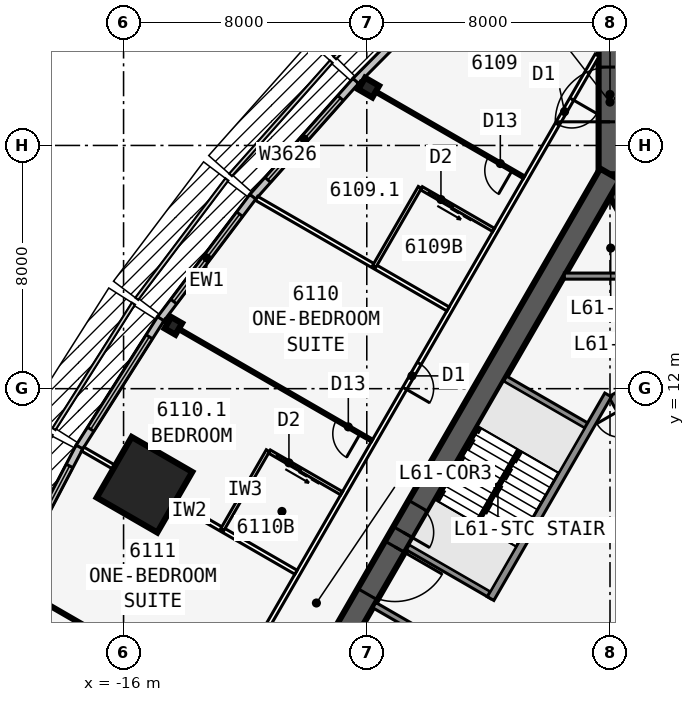
"""IFC4 building model, lengths in metres.
Left out: names, types, materials, properties, quantities, classifications, styles, units other than length and angle.
Written with IfcOpenShell. Run it as: python <this file> out.ifc"""

import sys

from ifc_helpers import new_model, si_unit, direction, frame, frame_2d, origin, origin_2d, place, context, subcontext, project, spatial, rectangle, i_section, extrude, element, fill, save


model = new_model("IFC4")
c1 = context("Model", 3, precision=1e-05, world=origin(), true_north=direction((0.0, 1.0)))
c2 = subcontext(c1, "Body", "Model", "MODEL_VIEW")
j1 = project(units=[si_unit("LENGTHUNIT", "METRE"), si_unit("PLANEANGLEUNIT", "RADIAN")], contexts=[c1])
p1 = place(None, origin())
s1 = spatial("IfcSite", under=j1, at=p1, CompositionType="ELEMENT")
p2 = place(p1, origin())
s2 = spatial("IfcBuilding", under=s1, at=p2, CompositionType="ELEMENT")
p3 = place(p2, frame((0.0, 0.0, 229.7)))
s3 = spatial("IfcBuildingStorey", under=s2, at=p3, CompositionType="ELEMENT", Elevation=229.7)
p4 = place(p3, frame((16.5, -9.526, 0.0), z_axis=(0.0, 0.0, 1.0), x_axis=(-0.499999749417, 0.866025548458, 0.0)))
e1 = element("IfcWall", 1, at=p4, inside=s3, PredefinedType="SHEAR", context=c2, shape_type="SweptSolid", body=[
    extrude(rectangle(XDim=33.0, YDim=0.75, at=frame_2d((16.5, 0.0))), origin(), (0.0, 0.0, 1.0), 3.6),
])
p5 = place(p4, frame((14.15, 0.0, 0.0)))
e2 = element("IfcOpeningElement", 2, at=p5, cuts=e1, PredefinedType="OPENING", context=c2, shape_type="SweptSolid", body=[
    extrude(rectangle(XDim=1.8, YDim=2.13, at=frame_2d((0.9, 1.065))), frame((0.0, 0.385, 0.0), z_axis=(0.0, -1.0, 0.0), x_axis=(1.0, 0.0, 0.0)), (0.0, 0.0, 1.0), 0.77),
])
p6 = place(p4, frame((12.6, 0.0, 0.0)))
e3 = element("IfcOpeningElement", 3, at=p6, cuts=e1, PredefinedType="OPENING", context=c2, shape_type="SweptSolid", body=[
    extrude(rectangle(XDim=1.0, YDim=2.13, at=frame_2d((0.5, 1.065))), frame((0.0, 0.385, 0.0), z_axis=(0.0, -1.0, 0.0), x_axis=(1.0, 0.0, 0.0)), (0.0, 0.0, 1.0), 0.77),
])
p7 = place(p3, frame((5.379, 2.586, 0.0), z_axis=(0.0, 0.0, 1.0), x_axis=(-0.500001375892, 0.866024609411, 0.0)))
e4 = element("IfcWall", 4, at=p7, inside=s3, PredefinedType="SOLIDWALL", context=c2, shape_type="SweptSolid", body=[
    extrude(rectangle(XDim=10.633, YDim=0.25, at=frame_2d((5.316, 0.0))), origin(), (0.0, 0.0, 1.0), 3.35),
])
p8 = place(p7, frame((9.164, 0.0, 0.0)))
e5 = element("IfcOpeningElement", 5, at=p8, cuts=e4, PredefinedType="OPENING", context=c2, shape_type="SweptSolid", body=[
    extrude(rectangle(XDim=0.9, YDim=2.13, at=frame_2d((0.45, 1.065))), frame((0.0, 0.135, 0.0), z_axis=(0.0, -1.0, 0.0), x_axis=(1.0, 0.0, 0.0)), (0.0, 0.0, 1.0), 0.27),
])
p9 = place(p7, frame((1.0, 0.0, 0.0)))
e6 = element("IfcOpeningElement", 6, at=p9, cuts=e4, PredefinedType="OPENING", context=c2, shape_type="SweptSolid", body=[
    extrude(rectangle(XDim=1.1, YDim=2.13, at=frame_2d((0.55, 1.065))), frame((0.0, 0.135, 0.0), z_axis=(0.0, -1.0, 0.0), x_axis=(1.0, 0.0, 0.0)), (0.0, 0.0, 1.0), 0.27),
])
p10 = place(p7, frame((3.9, 0.0, 0.0)))
e7 = element("IfcOpeningElement", 7, at=p10, cuts=e4, PredefinedType="OPENING", context=c2, shape_type="SweptSolid", body=[
    extrude(rectangle(XDim=1.1, YDim=2.13, at=frame_2d((0.55, 1.065))), frame((0.0, 0.135, 0.0), z_axis=(0.0, -1.0, 0.0), x_axis=(1.0, 0.0, 0.0)), (0.0, 0.0, 1.0), 0.27),
])
p11 = place(p7, frame((6.8, 0.0, 0.0)))
e8 = element("IfcOpeningElement", 8, at=p11, cuts=e4, PredefinedType="OPENING", context=c2, shape_type="SweptSolid", body=[
    extrude(rectangle(XDim=1.1, YDim=2.13, at=frame_2d((0.55, 1.065))), frame((0.0, 0.135, 0.0), z_axis=(0.0, -1.0, 0.0), x_axis=(1.0, 0.0, 0.0)), (0.0, 0.0, 1.0), 0.27),
])
p12 = place(p3, frame((0.0, 19.052, 0.0), z_axis=(0.0, 0.0, 1.0), x_axis=(-0.499999749417, -0.866025548458, 0.0)))
e9 = element("IfcWall", 9, at=p12, inside=s3, PredefinedType="SHEAR", context=c2, shape_type="SweptSolid", body=[
    extrude(rectangle(XDim=33.0, YDim=0.75, at=frame_2d((16.5, 0.0))), origin(), (0.0, 0.0, 1.0), 3.6),
])
p13 = place(p12, frame((14.15, 0.0, 0.0)))
e10 = element("IfcOpeningElement", 10, at=p13, cuts=e9, PredefinedType="OPENING", context=c2, shape_type="SweptSolid", body=[
    extrude(rectangle(XDim=1.8, YDim=2.13, at=frame_2d((0.9, 1.065))), frame((0.0, 0.385, 0.0), z_axis=(0.0, -1.0, 0.0), x_axis=(1.0, 0.0, 0.0)), (0.0, 0.0, 1.0), 0.77),
])
p14 = place(p12, frame((12.6, 0.0, 0.0)))
e11 = element("IfcOpeningElement", 11, at=p14, cuts=e9, PredefinedType="OPENING", context=c2, shape_type="SweptSolid", body=[
    extrude(rectangle(XDim=1.0, YDim=2.13, at=frame_2d((0.5, 1.065))), frame((0.0, 0.385, 0.0), z_axis=(0.0, -1.0, 0.0), x_axis=(1.0, 0.0, 0.0)), (0.0, 0.0, 1.0), 0.77),
])
p15 = place(p3, frame((-0.062, 11.794, 0.0), z_axis=(0.0, 0.0, 1.0), x_axis=(-0.500006680225, -0.86602154692, 0.0)))
e12 = element("IfcWall", 12, at=p15, inside=s3, PredefinedType="SOLIDWALL", context=c2, shape_type="SweptSolid", body=[
    extrude(rectangle(XDim=7.733, YDim=0.25, at=frame_2d((3.866, 0.0))), origin(), (0.0, 0.0, 1.0), 3.35),
])
for number, where, z_axis, x_axis in (
    (13, (-0.679, 10.727, 0.0), (0.0, 0.0, 1.0), (-0.866, 0.5, 0.0)),
    (14, (-3.879, 5.184, 0.0), (0.0, 0.0, 1.0), (-0.866, 0.5, 0.0)),
    (15, (-4.979, 3.279, 0.0), (0.0, 0.0, 1.0), (-0.866, 0.5, 0.0)),
):
    element("IfcWall", number, at=place(p3, frame(where, z_axis=z_axis, x_axis=x_axis)), inside=s3, PredefinedType="SOLIDWALL", context=c2, shape_type="SweptSolid", body=[
        extrude(rectangle(XDim=3.2, YDim=0.2, at=frame_2d((1.6, 0.0))), origin(), (0.0, 0.0, 1.0), 3.35),
    ])
p16 = place(p3, frame((0.0, 19.052, 0.0), z_axis=(0.0, 0.0, 1.0), x_axis=(0.0, 1.0, 0.0)))
e16 = element("IfcWall", 16, at=p16, inside=s3, PredefinedType="SHEAR", context=c2, shape_type="SweptSolid", body=[
    extrude(rectangle(XDim=4.746, YDim=0.75, at=frame_2d((2.373, 0.0))), origin(), (0.0, 0.0, 1.0), 3.6),
])
p17 = place(p16, frame((1.725, 0.0, 0.0)))
e17 = element("IfcOpeningElement", 17, at=p17, cuts=e16, PredefinedType="OPENING", context=c2, shape_type="SweptSolid", body=[
    extrude(rectangle(XDim=1.8, YDim=2.13, at=frame_2d((0.9, 1.065))), frame((0.0, 0.385, 0.0), z_axis=(0.0, -1.0, 0.0), x_axis=(1.0, 0.0, 0.0)), (0.0, 0.0, 1.0), 0.77),
])
p18 = place(p3, frame((-7.937, 21.903, 0.0), z_axis=(0.0, 0.0, 1.0), x_axis=(-0.5, -0.866025403784, 0.0)))
e18 = element("IfcColumn", 18, at=p18, inside=s3, PredefinedType="COLUMN", context=c2, shape_type="SweptSolid", body=[
    extrude(i_section(OverallWidth=0.442, OverallDepth=0.531, WebThickness=0.066, FlangeThickness=0.106, at=origin_2d()), origin(), (0.0, 0.0, 1.0), 3.6),
])
p19 = place(p3, frame((-14.363, 14.066, 0.0), z_axis=(0.0, 0.0, 1.0), x_axis=(-0.866025403784, 0.5, 0.0)))
e19 = element("IfcColumn", 19, at=p19, inside=s3, PredefinedType="COLUMN", context=c2, shape_type="SweptSolid", body=[
    extrude(i_section(OverallWidth=0.411, OverallDepth=0.434, WebThickness=0.036, FlangeThickness=0.057, at=origin_2d()), origin(), (0.0, 0.0, 1.0), 3.6),
])
p20 = place(p3, frame((-15.312, 8.84, 0.0), z_axis=(0.0, 0.0, 1.0), x_axis=(-0.866025403784, 0.5, 0.0)))
e20 = element("IfcColumn", 20, at=p20, inside=s3, PredefinedType="COLUMN", context=c2, shape_type="SweptSolid", body=[
    extrude(rectangle(XDim=2.3, YDim=2.3, at=origin_2d()), origin(), (0.0, 0.0, 1.0), 3.6),
])
p21 = place(p3, frame((-6.911, 23.583, 0.0), z_axis=(0.0, 0.0, 1.0), x_axis=(-0.704149946111, -0.710051303352, 0.0)))
e21 = element("IfcWall", 21, at=p21, inside=s3, PredefinedType="STANDARD", context=c2, shape_type="SweptSolid", body=[
    extrude(rectangle(XDim=2.069, YDim=0.25, at=frame_2d((1.034, 0.0))), origin(), (0.0, 0.0, 1.0), 3.35),
])
p22 = place(p3, frame((-8.363, 22.12, 0.0), z_axis=(0.0, 0.0, 1.0), x_axis=(-0.664348996191, -0.747422511876, 0.0)))
e22 = element("IfcWall", 22, at=p22, inside=s3, PredefinedType="STANDARD", context=c2, shape_type="SweptSolid", body=[
    extrude(rectangle(XDim=5.105, YDim=0.25, at=frame_2d((2.552, 0.0))), origin(), (0.0, 0.0, 1.0), 3.35),
])
p23 = place(p22, frame((0.752, 0.0, 0.45)))
e23 = element("IfcOpeningElement", 23, at=p23, cuts=e22, PredefinedType="OPENING", context=c2, shape_type="SweptSolid", body=[
    extrude(rectangle(XDim=3.6, YDim=2.6, at=frame_2d((1.8, 1.3))), frame((0.0, 0.135, 0.0), z_axis=(0.0, -1.0, 0.0), x_axis=(1.0, 0.0, 0.0)), (0.0, 0.0, 1.0), 0.27),
])
p24 = place(p3, frame((-11.748, 18.312, 0.0), z_axis=(0.0, 0.0, 1.0), x_axis=(-0.602408653511, -0.798187831388, 0.0)))
e24 = element("IfcWall", 24, at=p24, inside=s3, PredefinedType="STANDARD", context=c2, shape_type="SweptSolid", body=[
    extrude(rectangle(XDim=5.038, YDim=0.25, at=frame_2d((2.519, 0.0))), origin(), (0.0, 0.0, 1.0), 3.35),
])
p25 = place(p24, frame((0.719, 0.0, 0.45)))
e25 = element("IfcOpeningElement", 25, at=p25, cuts=e24, PredefinedType="OPENING", context=c2, shape_type="SweptSolid", body=[
    extrude(rectangle(XDim=3.6, YDim=2.6, at=frame_2d((1.8, 1.3))), frame((0.0, 0.135, 0.0), z_axis=(0.0, -1.0, 0.0), x_axis=(1.0, 0.0, 0.0)), (0.0, 0.0, 1.0), 0.27),
])
p26 = place(p3, frame((-14.777, 14.299, 0.0), z_axis=(0.0, 0.0, 1.0), x_axis=(-0.535220361449, -0.844712474568, 0.0)))
e26 = element("IfcWall", 26, at=p26, inside=s3, PredefinedType="STANDARD", context=c2, shape_type="SweptSolid", body=[
    extrude(rectangle(XDim=5.004, YDim=0.25, at=frame_2d((2.502, 0.0))), origin(), (0.0, 0.0, 1.0), 3.35),
])
p27 = place(p26, frame((0.702, 0.0, 0.45)))
e27 = element("IfcOpeningElement", 27, at=p27, cuts=e26, PredefinedType="OPENING", context=c2, shape_type="SweptSolid", body=[
    extrude(rectangle(XDim=3.6, YDim=2.6, at=frame_2d((1.8, 1.3))), frame((0.0, 0.135, 0.0), z_axis=(0.0, -1.0, 0.0), x_axis=(1.0, 0.0, 0.0)), (0.0, 0.0, 1.0), 0.27),
])
p28 = place(p3, frame((-17.45, 10.081, 0.0), z_axis=(0.0, 0.0, 1.0), x_axis=(-0.463976002579, -0.885847768542, 0.0)))
e28 = element("IfcWall", 28, at=p28, inside=s3, PredefinedType="STANDARD", context=c2, shape_type="SweptSolid", body=[
    extrude(rectangle(XDim=5.004, YDim=0.25, at=frame_2d((2.502, 0.0))), origin(), (0.0, 0.0, 1.0), 3.35),
])
p29 = place(p28, frame((0.702, 0.0, 0.45)))
e29 = element("IfcOpeningElement", 29, at=p29, cuts=e28, PredefinedType="OPENING", context=c2, shape_type="SweptSolid", body=[
    extrude(rectangle(XDim=3.6, YDim=2.6, at=frame_2d((1.8, 1.3))), frame((0.0, 0.135, 0.0), z_axis=(0.0, -1.0, 0.0), x_axis=(1.0, 0.0, 0.0)), (0.0, 0.0, 1.0), 0.27),
])
p30 = place(p3, frame((-0.425, 22.966, 0.0), z_axis=(0.0, 0.0, 1.0), x_axis=(-0.500000265775, -0.866025250339, 0.0)))
e30 = element("IfcWall", 30, at=p30, inside=s3, PredefinedType="PARTITIONING", context=c2, shape_type="SweptSolid", body=[
    extrude(rectangle(XDim=39.354, YDim=0.15, at=frame_2d((19.677, 0.0))), origin(), (0.0, 0.0, 1.0), 3.35),
])
p31 = place(p30, frame((1.665, 0.0, 0.0)))
e31 = element("IfcOpeningElement", 31, at=p31, cuts=e30, PredefinedType="OPENING", context=c2, shape_type="SweptSolid", body=[
    extrude(rectangle(XDim=0.95, YDim=2.13, at=frame_2d((0.475, 1.065))), frame((0.0, 0.085, 0.0), z_axis=(0.0, -1.0, 0.0), x_axis=(1.0, 0.0, 0.0)), (0.0, 0.0, 1.0), 0.17),
])
p32 = place(p30, frame((11.702, 0.0, 0.0)))
e32 = element("IfcOpeningElement", 32, at=p32, cuts=e30, PredefinedType="OPENING", context=c2, shape_type="SweptSolid", body=[
    extrude(rectangle(XDim=0.95, YDim=2.13, at=frame_2d((0.475, 1.065))), frame((0.0, 0.085, 0.0), z_axis=(0.0, -1.0, 0.0), x_axis=(1.0, 0.0, 0.0)), (0.0, 0.0, 1.0), 0.17),
])
p33 = place(p30, frame((21.702, 0.0, 0.0)))
e33 = element("IfcOpeningElement", 33, at=p33, cuts=e30, PredefinedType="OPENING", context=c2, shape_type="SweptSolid", body=[
    extrude(rectangle(XDim=0.95, YDim=2.13, at=frame_2d((0.475, 1.065))), frame((0.0, 0.085, 0.0), z_axis=(0.0, -1.0, 0.0), x_axis=(1.0, 0.0, 0.0)), (0.0, 0.0, 1.0), 0.17),
])
p34 = place(p30, frame((36.739, 0.0, 0.0)))
e34 = element("IfcOpeningElement", 34, at=p34, cuts=e30, PredefinedType="OPENING", context=c2, shape_type="SweptSolid", body=[
    extrude(rectangle(XDim=0.95, YDim=2.13, at=frame_2d((0.475, 1.065))), frame((0.0, 0.085, 0.0), z_axis=(0.0, -1.0, 0.0), x_axis=(1.0, 0.0, 0.0)), (0.0, 0.0, 1.0), 0.17),
])
p35 = place(p3, frame((-2.829, 18.954, 0.0), z_axis=(0.0, 0.0, 1.0), x_axis=(-0.866026604282, 0.499997920671, 0.0)))
e35 = element("IfcWall", 35, at=p35, inside=s3, PredefinedType="PARTITIONING", context=c2, shape_type="SweptSolid", body=[
    extrude(rectangle(XDim=6.24, YDim=0.1, at=frame_2d((3.12, 0.0))), origin(), (0.0, 0.0, 1.0), 2.25),
])
p36 = place(p35, frame((0.45, 0.0, 0.0)))
e36 = element("IfcOpeningElement", 36, at=p36, cuts=e35, PredefinedType="OPENING", context=c2, shape_type="SweptSolid", body=[
    extrude(rectangle(XDim=0.9, YDim=2.13, at=frame_2d((0.45, 1.065))), frame((0.0, 0.06, 0.0), z_axis=(0.0, -1.0, 0.0), x_axis=(1.0, 0.0, 0.0)), (0.0, 0.0, 1.0), 0.12),
])
p37 = place(p3, frame((-5.329, 14.623, 0.0), z_axis=(0.0, 0.0, 1.0), x_axis=(-0.866017877653, 0.500013035415, 0.0)))
e37 = element("IfcWall", 37, at=p37, inside=s3, PredefinedType="PARTITIONING", context=c2, shape_type="SweptSolid", body=[
    extrude(rectangle(XDim=7.273, YDim=0.15, at=frame_2d((3.636, 0.0))), origin(), (0.0, 0.0, 1.0), 2.309),
])
p38 = place(p3, frame((-7.829, 10.293, 0.0), z_axis=(0.0, 0.0, 1.0), x_axis=(-0.866030558329, 0.49999107196, 0.0)))
e38 = element("IfcWall", 38, at=p38, inside=s3, PredefinedType="PARTITIONING", context=c2, shape_type="SweptSolid", body=[
    extrude(rectangle(XDim=7.894, YDim=0.1, at=frame_2d((3.947, 0.0))), origin(), (0.0, 0.0, 1.0), 2.25),
])
p39 = place(p38, frame((0.45, 0.0, 0.0)))
e39 = element("IfcOpeningElement", 39, at=p39, cuts=e38, PredefinedType="OPENING", context=c2, shape_type="SweptSolid", body=[
    extrude(rectangle(XDim=0.9, YDim=2.13, at=frame_2d((0.45, 1.065))), frame((0.0, 0.06, 0.0), z_axis=(0.0, -1.0, 0.0), x_axis=(1.0, 0.0, 0.0)), (0.0, 0.0, 1.0), 0.12),
])
p40 = place(p3, frame((-10.329, 5.963, 0.0), z_axis=(0.0, 0.0, 1.0), x_axis=(-0.866016460812, 0.500015489362, 0.0)))
e40 = element("IfcWall", 40, at=p40, inside=s3, PredefinedType="PARTITIONING", context=c2, shape_type="SweptSolid", body=[
    extrude(rectangle(XDim=8.101, YDim=0.15, at=frame_2d((4.051, 0.0))), origin(), (0.0, 0.0, 1.0), 2.309),
])
p41 = place(p3, frame((-12.829, 1.633, 0.0), z_axis=(0.0, 0.0, 1.0), x_axis=(-0.866030558329, 0.49999107196, 0.0)))
e41 = element("IfcWall", 41, at=p41, inside=s3, PredefinedType="PARTITIONING", context=c2, shape_type="SweptSolid", body=[
    extrude(rectangle(XDim=7.894, YDim=0.1, at=frame_2d((3.947, 0.0))), origin(), (0.0, 0.0, 1.0), 2.25),
])
p42 = place(p41, frame((0.45, 0.0, 0.0)))
e42 = element("IfcOpeningElement", 42, at=p42, cuts=e41, PredefinedType="OPENING", context=c2, shape_type="SweptSolid", body=[
    extrude(rectangle(XDim=0.9, YDim=2.13, at=frame_2d((0.45, 1.065))), frame((0.0, 0.06, 0.0), z_axis=(0.0, -1.0, 0.0), x_axis=(1.0, 0.0, 0.0)), (0.0, 0.0, 1.0), 0.12),
])
p43 = place(p3, frame((-6.253, 18.622, 0.0), z_axis=(0.0, 0.0, 1.0), x_axis=(-0.499990139034, -0.866031096941, 0.0)))
e43 = element("IfcWall", 43, at=p43, inside=s3, PredefinedType="PLUMBINGWALL", context=c2, shape_type="SweptSolid", body=[
    extrude(rectangle(XDim=3.0, YDim=0.12, at=frame_2d((1.5, 0.0))), origin(), (0.0, 0.0, 1.0), 3.35),
])
p44 = place(p3, frame((-3.829, 17.221, 0.0), z_axis=(0.0, 0.0, 1.0), x_axis=(-0.865997131366, 0.500048966069, 0.0)))
e44 = element("IfcWall", 44, at=p44, inside=s3, PredefinedType="PLUMBINGWALL", context=c2, shape_type="SweptSolid", body=[
    extrude(rectangle(XDim=2.74, YDim=0.12, at=frame_2d((1.37, 0.0))), origin(), (0.0, 0.0, 1.0), 3.35),
])
p45 = place(p44, frame((1.55, 0.0, 0.0)))
e45 = element("IfcOpeningElement", 45, at=p45, cuts=e44, PredefinedType="OPENING", context=c2, shape_type="SweptSolid", body=[
    extrude(rectangle(XDim=0.9, YDim=2.13, at=frame_2d((0.45, 1.065))), frame((0.0, 0.07, 0.0), z_axis=(0.0, -1.0, 0.0), x_axis=(1.0, 0.0, 0.0)), (0.0, 0.0, 1.0), 0.14),
])
p46 = place(p3, frame((-11.253, 9.961, 0.0), z_axis=(0.0, 0.0, 1.0), x_axis=(-0.499990139034, -0.866031096941, 0.0)))
e46 = element("IfcWall", 46, at=p46, inside=s3, PredefinedType="PLUMBINGWALL", context=c2, shape_type="SweptSolid", body=[
    extrude(rectangle(XDim=3.0, YDim=0.12, at=frame_2d((1.5, 0.0))), origin(), (0.0, 0.0, 1.0), 3.35),
])
p47 = place(p3, frame((-8.829, 8.561, 0.0), z_axis=(0.0, 0.0, 1.0), x_axis=(-0.866035715982, 0.499982138324, 0.0)))
e47 = element("IfcWall", 47, at=p47, inside=s3, PredefinedType="PLUMBINGWALL", context=c2, shape_type="SweptSolid", body=[
    extrude(rectangle(XDim=2.74, YDim=0.12, at=frame_2d((1.37, 0.0))), origin(), (0.0, 0.0, 1.0), 3.35),
])
p48 = place(p47, frame((1.55, 0.0, 0.0)))
e48 = element("IfcOpeningElement", 48, at=p48, cuts=e47, PredefinedType="OPENING", context=c2, shape_type="SweptSolid", body=[
    extrude(rectangle(XDim=0.9, YDim=2.13, at=frame_2d((0.45, 1.065))), frame((0.0, 0.07, 0.0), z_axis=(0.0, -1.0, 0.0), x_axis=(1.0, 0.0, 0.0)), (0.0, 0.0, 1.0), 0.14),
])
p49 = place(p3, frame((-1.501, 15.703, 0.0), z_axis=(0.0, 0.0, 1.0), x_axis=(1.0, 0.0, 0.0)))
e49 = element("IfcWall", 49, at=p49, inside=s3, PredefinedType="SOLIDWALL", context=c2, shape_type="SweptSolid", body=[
    extrude(rectangle(XDim=3.002, YDim=0.2, at=frame_2d((1.501, 0.0))), origin(), (0.0, 0.0, 1.0), 3.35),
])
p50 = place(p3, frame((-2.988, 9.978, 0.0), z_axis=(0.0, 0.0, 1.0), x_axis=(-0.499992232847, -0.866029888106, 0.0)))
e50 = element("IfcWall", 50, at=p50, inside=s3, PredefinedType="SOLIDWALL", context=c2, shape_type="SweptSolid", body=[
    extrude(rectangle(XDim=2.794, YDim=0.1, at=frame_2d((1.397, 0.0))), origin(), (0.0, 0.0, 1.0), 3.6),
])
p51 = place(p23, origin())
e51 = element("IfcWindow", 51, at=p51, inside=s3, PartitioningType="SINGLE_PANEL", PredefinedType="WINDOW", context=c2, shape_type="SweptSolid", body=[
    extrude(rectangle(XDim=3.6, YDim=2.6, at=frame_2d((1.8, 1.3))), frame((0.0, 0.03, 0.0), z_axis=(0.0, -1.0, 0.0), x_axis=(1.0, 0.0, 0.0)), (0.0, 0.0, 1.0), 0.06),
])
fill(e23, e51)
p52 = place(p25, origin())
e52 = element("IfcWindow", 52, at=p52, inside=s3, PartitioningType="SINGLE_PANEL", PredefinedType="WINDOW", context=c2, shape_type="SweptSolid", body=[
    extrude(rectangle(XDim=3.6, YDim=2.6, at=frame_2d((1.8, 1.3))), frame((0.0, 0.03, 0.0), z_axis=(0.0, -1.0, 0.0), x_axis=(1.0, 0.0, 0.0)), (0.0, 0.0, 1.0), 0.06),
])
fill(e25, e52)
p53 = place(p27, origin())
e53 = element("IfcWindow", 53, at=p53, inside=s3, PartitioningType="SINGLE_PANEL", PredefinedType="WINDOW", context=c2, shape_type="SweptSolid", body=[
    extrude(rectangle(XDim=3.6, YDim=2.6, at=frame_2d((1.8, 1.3))), frame((0.0, 0.03, 0.0), z_axis=(0.0, -1.0, 0.0), x_axis=(1.0, 0.0, 0.0)), (0.0, 0.0, 1.0), 0.06),
])
fill(e27, e53)
p54 = place(p29, origin())
e54 = element("IfcWindow", 54, at=p54, inside=s3, PartitioningType="SINGLE_PANEL", PredefinedType="WINDOW", context=c2, shape_type="SweptSolid", body=[
    extrude(rectangle(XDim=3.6, YDim=2.6, at=frame_2d((1.8, 1.3))), frame((0.0, 0.03, 0.0), z_axis=(0.0, -1.0, 0.0), x_axis=(1.0, 0.0, 0.0)), (0.0, 0.0, 1.0), 0.06),
])
fill(e29, e54)
p55 = place(p36, origin())
e55 = element("IfcDoor", 55, at=p55, inside=s3, OperationType="SINGLE_SWING_LEFT", PredefinedType="DOOR", context=c2, shape_type="SweptSolid", body=[
    extrude(rectangle(XDim=0.9, YDim=2.13, at=frame_2d((0.45, 1.065))), frame((0.0, 0.025, 0.0), z_axis=(0.0, -1.0, 0.0), x_axis=(1.0, 0.0, 0.0)), (0.0, 0.0, 1.0), 0.05),
])
fill(e36, e55)
p56 = place(p39, origin())
e56 = element("IfcDoor", 56, at=p56, inside=s3, OperationType="SINGLE_SWING_LEFT", PredefinedType="DOOR", context=c2, shape_type="SweptSolid", body=[
    extrude(rectangle(XDim=0.9, YDim=2.13, at=frame_2d((0.45, 1.065))), frame((0.0, 0.025, 0.0), z_axis=(0.0, -1.0, 0.0), x_axis=(1.0, 0.0, 0.0)), (0.0, 0.0, 1.0), 0.05),
])
fill(e39, e56)
p57 = place(p31, origin())
e57 = element("IfcDoor", 57, at=p57, inside=s3, OperationType="SINGLE_SWING_LEFT", PredefinedType="DOOR", context=c2, shape_type="SweptSolid", body=[
    extrude(rectangle(XDim=0.95, YDim=2.13, at=frame_2d((0.475, 1.065))), frame((0.0, 0.025, 0.0), z_axis=(0.0, -1.0, 0.0), x_axis=(1.0, 0.0, 0.0)), (0.0, 0.0, 1.0), 0.05),
])
fill(e31, e57)
p58 = place(p45, origin())
e58 = element("IfcDoor", 58, at=p58, inside=s3, OperationType="SLIDING_TO_LEFT", PredefinedType="DOOR", context=c2, shape_type="SweptSolid", body=[
    extrude(rectangle(XDim=0.9, YDim=2.13, at=frame_2d((0.45, 1.065))), frame((0.0, 0.025, 0.0), z_axis=(0.0, -1.0, 0.0), x_axis=(1.0, 0.0, 0.0)), (0.0, 0.0, 1.0), 0.05),
])
fill(e45, e58)
p59 = place(p32, origin())
e59 = element("IfcDoor", 59, at=p59, inside=s3, OperationType="SINGLE_SWING_RIGHT", PredefinedType="DOOR", context=c2, shape_type="SweptSolid", body=[
    extrude(rectangle(XDim=0.95, YDim=2.13, at=frame_2d((0.475, 1.065))), frame((0.0, 0.025, 0.0), z_axis=(0.0, -1.0, 0.0), x_axis=(1.0, 0.0, 0.0)), (0.0, 0.0, 1.0), 0.05),
])
fill(e32, e59)
p60 = place(p48, origin())
e60 = element("IfcDoor", 60, at=p60, inside=s3, OperationType="SLIDING_TO_LEFT", PredefinedType="DOOR", context=c2, shape_type="SweptSolid", body=[
    extrude(rectangle(XDim=0.9, YDim=2.13, at=frame_2d((0.45, 1.065))), frame((0.0, 0.025, 0.0), z_axis=(0.0, -1.0, 0.0), x_axis=(1.0, 0.0, 0.0)), (0.0, 0.0, 1.0), 0.05),
])
fill(e48, e60)
p61 = place(p13, origin())
e61 = element("IfcDoor", 61, at=p61, inside=s3, OperationType="DOUBLE_DOOR_SINGLE_SWING", PredefinedType="DOOR", context=c2, shape_type="SweptSolid", body=[
    extrude(rectangle(XDim=1.8, YDim=2.13, at=frame_2d((0.9, 1.065))), frame((0.0, 0.025, 0.0), z_axis=(0.0, -1.0, 0.0), x_axis=(1.0, 0.0, 0.0)), (0.0, 0.0, 1.0), 0.05),
])
fill(e10, e61)
p62 = place(p14, origin())
e62 = element("IfcDoor", 62, at=p62, inside=s3, OperationType="SINGLE_SWING_RIGHT", PredefinedType="DOOR", context=c2, shape_type="SweptSolid", body=[
    extrude(rectangle(XDim=1.0, YDim=2.13, at=frame_2d((0.5, 1.065))), frame((0.0, 0.025, 0.0), z_axis=(0.0, -1.0, 0.0), x_axis=(1.0, 0.0, 0.0)), (0.0, 0.0, 1.0), 0.05),
])
fill(e11, e62)
p63 = place(p17, origin())
e63 = element("IfcDoor", 63, at=p63, inside=s3, OperationType="DOUBLE_DOOR_DOUBLE_SWING", PredefinedType="DOOR", context=c2, shape_type="SweptSolid", body=[
    extrude(rectangle(XDim=1.8, YDim=2.13, at=frame_2d((0.9, 1.065))), frame((0.0, 0.025, 0.0), z_axis=(0.0, -1.0, 0.0), x_axis=(1.0, 0.0, 0.0)), (0.0, 0.0, 1.0), 0.05),
])
fill(e17, e63)
save(model, sys.argv[1])
